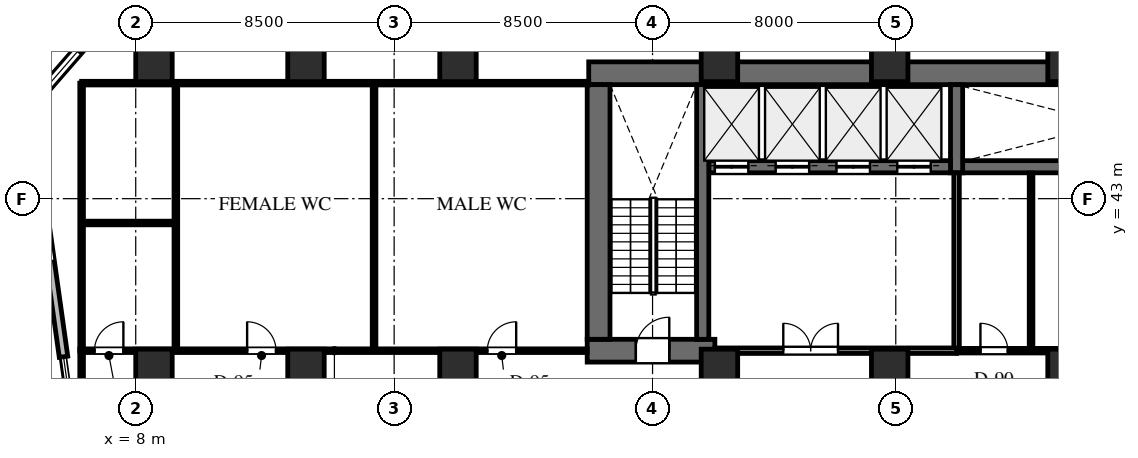
"""IFC4 building model, lengths in metres.
Left out: names, types, materials, properties, quantities, classifications, styles, units other than length and angle.
Written with IfcOpenShell. Run it as: python <this file> out.ifc"""

import sys

from ifc_helpers import new_model, si_unit, direction, frame, frame_2d, origin, origin_2d, place, context, subcontext, project, spatial, rectangle, extrude, element, fill, save


model = new_model("IFC4")
c1 = context("Model", 3, precision=1e-05, world=origin(), true_north=direction((0.0, 1.0)))
c2 = subcontext(c1, "Body", "Model", "MODEL_VIEW")
j1 = project(units=[si_unit("LENGTHUNIT", "METRE"), si_unit("PLANEANGLEUNIT", "RADIAN")], contexts=[c1])
p1 = place(None, origin())
s1 = spatial("IfcSite", under=j1, at=p1, CompositionType="ELEMENT")
p2 = place(p1, origin())
s2 = spatial("IfcBuilding", under=s1, at=p2, CompositionType="ELEMENT")
p3 = place(p2, frame((0.0, 0.0, 77.5)))
s3 = spatial("IfcBuildingStorey", under=s2, at=p3, CompositionType="ELEMENT", Elevation=77.5)
p4 = place(p3, frame((22.9, 47.125, 0.0), z_axis=(0.0, 0.0, 1.0), x_axis=(1.0, 0.0, 0.0)))
e1 = element("IfcWall", 1, at=p4, inside=s3, PredefinedType="SHEAR", context=c2, shape_type="SweptSolid", body=[
    extrude(rectangle(XDim=43.7, YDim=0.75, at=frame_2d((21.85, 0.0))), origin(), (0.0, 0.0, 1.0), 4.0),
])
p5 = place(p3, frame((35.2, 44.05, 0.0), z_axis=(0.0, 0.0, 1.0), x_axis=(1.0, 0.0, 0.0)))
e2 = element("IfcWall", 2, at=p5, inside=s3, PredefinedType="SHEAR", context=c2, shape_type="SweptSolid", body=[
    extrude(rectangle(XDim=9.65, YDim=0.4, at=frame_2d((4.825, 0.0))), origin(), (0.0, 0.0, 1.0), 4.0),
])
p6 = place(p3, frame((35.0, 43.85, 0.0), z_axis=(0.0, 0.0, 1.0), x_axis=(0.0, 1.0, 0.0)))
e3 = element("IfcWall", 3, at=p6, inside=s3, PredefinedType="SHEAR", context=c2, shape_type="SweptSolid", body=[
    extrude(rectangle(XDim=2.9, YDim=0.4, at=frame_2d((1.45, 0.0))), origin(), (0.0, 0.0, 1.0), 4.0),
])
p7 = place(p3, frame((26.85, 44.05, 0.0), z_axis=(0.0, 0.0, 1.0), x_axis=(1.0, 0.0, 0.0)))
e4 = element("IfcWall", 4, at=p7, inside=s3, PredefinedType="SHEAR", context=c2, shape_type="SweptSolid", body=[
    extrude(rectangle(XDim=7.95, YDim=0.4, at=frame_2d((3.975, 0.0))), origin(), (0.0, 0.0, 1.0), 4.0),
])
p8 = place(p7, frame((0.2, 0.0, 0.0)))
e5 = element("IfcOpeningElement", 5, at=p8, cuts=e4, PredefinedType="OPENING", context=c2, shape_type="SweptSolid", body=[
    extrude(rectangle(XDim=1.1, YDim=2.2, at=frame_2d((0.55, 1.1))), frame((0.0, 0.21, 0.0), z_axis=(0.0, -1.0, 0.0), x_axis=(1.0, 0.0, 0.0)), (0.0, 0.0, 1.0), 0.42),
])
p9 = place(p7, frame((2.2, 0.0, 0.0)))
e6 = element("IfcOpeningElement", 6, at=p9, cuts=e4, PredefinedType="OPENING", context=c2, shape_type="SweptSolid", body=[
    extrude(rectangle(XDim=1.1, YDim=2.2, at=frame_2d((0.55, 1.1))), frame((0.0, 0.21, 0.0), z_axis=(0.0, -1.0, 0.0), x_axis=(1.0, 0.0, 0.0)), (0.0, 0.0, 1.0), 0.42),
])
p10 = place(p7, frame((4.2, 0.0, 0.0)))
e7 = element("IfcOpeningElement", 7, at=p10, cuts=e4, PredefinedType="OPENING", context=c2, shape_type="SweptSolid", body=[
    extrude(rectangle(XDim=1.1, YDim=2.2, at=frame_2d((0.55, 1.1))), frame((0.0, 0.21, 0.0), z_axis=(0.0, -1.0, 0.0), x_axis=(1.0, 0.0, 0.0)), (0.0, 0.0, 1.0), 0.42),
])
p11 = place(p7, frame((6.2, 0.0, 0.0)))
e8 = element("IfcOpeningElement", 8, at=p11, cuts=e4, PredefinedType="OPENING", context=c2, shape_type="SweptSolid", body=[
    extrude(rectangle(XDim=1.1, YDim=2.2, at=frame_2d((0.55, 1.1))), frame((0.0, 0.21, 0.0), z_axis=(0.0, -1.0, 0.0), x_axis=(1.0, 0.0, 0.0)), (0.0, 0.0, 1.0), 0.42),
])
p12 = place(p3, frame((22.85, 38.0, 0.0), z_axis=(0.0, 0.0, 1.0), x_axis=(1.0, 0.0, 0.0)))
e9 = element("IfcWall", 9, at=p12, inside=s3, PredefinedType="SHEAR", context=c2, shape_type="SweptSolid", body=[
    extrude(rectangle(XDim=4.2, YDim=0.75, at=frame_2d((2.1, 0.0))), origin(), (0.0, 0.0, 1.0), 4.0),
])
p13 = place(p12, frame((1.6, 0.0, 0.0)))
e10 = element("IfcOpeningElement", 10, at=p13, cuts=e9, PredefinedType="OPENING", context=c2, shape_type="SweptSolid", body=[
    extrude(rectangle(XDim=1.1, YDim=2.2, at=frame_2d((0.55, 1.1))), frame((0.0, 0.385, 0.0), z_axis=(0.0, -1.0, 0.0), x_axis=(1.0, 0.0, 0.0)), (0.0, 0.0, 1.0), 0.77),
])
p14 = place(p3, frame((23.225, 38.375, 0.0), z_axis=(0.0, 0.0, 1.0), x_axis=(0.0, 1.0, 0.0)))
e11 = element("IfcWall", 11, at=p14, inside=s3, PredefinedType="SHEAR", context=c2, shape_type="SweptSolid", body=[
    extrude(rectangle(XDim=8.375, YDim=0.75, at=frame_2d((4.188, 0.0))), origin(), (0.0, 0.0, 1.0), 4.0),
])
p15 = place(p3, frame((26.65, 38.375, 0.0), z_axis=(0.0, 0.0, 1.0), x_axis=(0.0, 1.0, 0.0)))
e12 = element("IfcWall", 12, at=p15, inside=s3, PredefinedType="SHEAR", context=c2, shape_type="SweptSolid", body=[
    extrude(rectangle(XDim=8.375, YDim=0.4, at=frame_2d((4.188, 0.0))), origin(), (0.0, 0.0, 1.0), 4.0),
])
for number, where, z_axis, x_axis in (
    (13, (38.6, 37.35, 0.0), (0.0, 0.0, 1.0), (1.0, 0.0, 0.0)),
    (14, (38.6, 47.55, 0.0), (0.0, 0.0, 1.0), (1.0, 0.0, 0.0)),
    (15, (32.8, 37.35, 0.0), (0.0, 0.0, 1.0), (1.0, 0.0, 0.0)),
    (16, (32.8, 47.55, 0.0), (0.0, 0.0, 1.0), (1.0, 0.0, 0.0)),
    (17, (27.2, 37.35, 0.0), (0.0, 0.0, 1.0), (1.0, 0.0, 0.0)),
    (18, (27.2, 47.55, 0.0), (0.0, 0.0, 1.0), (1.0, 0.0, 0.0)),
    (19, (18.6, 37.35, 0.0), (0.0, 0.0, 1.0), (1.0, 0.0, 0.0)),
    (20, (18.6, 47.55, 0.0), (0.0, 0.0, 1.0), (1.0, 0.0, 0.0)),
    (21, (13.6, 37.35, 0.0), (0.0, 0.0, 1.0), (1.0, 0.0, 0.0)),
    (22, (13.6, 47.55, 0.0), (0.0, 0.0, 1.0), (1.0, 0.0, 0.0)),
    (23, (8.6, 37.35, 0.0), (0.0, 0.0, 1.0), (1.0, 0.0, 0.0)),
    (24, (8.6, 47.55, 0.0), (0.0, 0.0, 1.0), (1.0, 0.0, 0.0)),
):
    element("IfcColumn", number, at=place(p3, frame(where, z_axis=z_axis, x_axis=x_axis)), inside=s3, PredefinedType="COLUMN", context=c2, shape_type="SweptSolid", body=[
        extrude(rectangle(XDim=1.2, YDim=1.4, at=origin_2d()), origin(), (0.0, 0.0, 1.0), 4.0),
    ])
p16 = place(p3, frame((5.625, 37.8, 0.0), z_axis=(0.0, 0.0, 1.0), x_axis=(-0.139180172484, 0.990267074878, 0.0)))
e25 = element("IfcWall", 25, at=p16, inside=s3, PredefinedType="STANDARD", context=c2, shape_type="SweptSolid", body=[
    extrude(rectangle(XDim=8.267, YDim=0.28, at=frame_2d((4.134, 0.0))), origin(), (0.0, 0.0, 1.0), 3.74),
])
p17 = place(p16, frame((3.173, 0.0, 0.65)))
e26 = element("IfcOpeningElement", 26, at=p17, cuts=e25, PredefinedType="OPENING", context=c2, shape_type="SweptSolid", body=[
    extrude(rectangle(XDim=1.8, YDim=2.1, at=frame_2d((0.9, 1.05))), frame((0.0, 0.15, 0.0), z_axis=(0.0, -1.0, 0.0), x_axis=(1.0, 0.0, 0.0)), (0.0, 0.0, 1.0), 0.3),
])
p18 = place(p3, frame((4.474, 45.987, 0.0), z_axis=(0.0, 0.0, 1.0), x_axis=(0.656070053895, 0.754699996278, 0.0)))
e27 = element("IfcWall", 27, at=p18, inside=s3, PredefinedType="STANDARD", context=c2, shape_type="SweptSolid", body=[
    extrude(rectangle(XDim=3.171, YDim=0.28, at=frame_2d((1.585, 0.0))), origin(), (0.0, 0.0, 1.0), 3.74),
])
p19 = place(p18, frame((0.667, 0.0, 0.65)))
e28 = element("IfcOpeningElement", 28, at=p19, cuts=e27, PredefinedType="OPENING", context=c2, shape_type="SweptSolid", body=[
    extrude(rectangle(XDim=1.8, YDim=2.1, at=frame_2d((0.9, 1.05))), frame((0.0, 0.15, 0.0), z_axis=(0.0, -1.0, 0.0), x_axis=(1.0, 0.0, 0.0)), (0.0, 0.0, 1.0), 0.3),
])
p20 = place(p3, frame((35.0, 38.0, 0.0), z_axis=(0.0, 0.0, 1.0), x_axis=(0.0, 1.0, 0.0)))
e29 = element("IfcWall", 29, at=p20, inside=s3, PredefinedType="STANDARD", context=c2, shape_type="SweptSolid", body=[
    extrude(rectangle(XDim=5.85, YDim=0.18, at=frame_2d((2.925, 0.0))), origin(), (0.0, 0.0, 1.0), 3.74),
])
p21 = place(p3, frame((27.05, 38.0, 0.0), z_axis=(0.0, 0.0, 1.0), x_axis=(1.0, 0.0, 0.0)))
e30 = element("IfcWall", 30, at=p21, inside=s3, PredefinedType="STANDARD", context=c2, shape_type="SweptSolid", body=[
    extrude(rectangle(XDim=7.95, YDim=0.18, at=frame_2d((3.975, 0.0))), origin(), (0.0, 0.0, 1.0), 2.813),
])
p22 = place(p21, frame((2.25, 0.0, 0.0)))
e31 = element("IfcOpeningElement", 31, at=p22, cuts=e30, PredefinedType="OPENING", context=c2, shape_type="SweptSolid", body=[
    extrude(rectangle(XDim=1.8, YDim=2.2, at=frame_2d((0.9, 1.1))), frame((0.0, 0.1, 0.0), z_axis=(0.0, -1.0, 0.0), x_axis=(1.0, 0.0, 0.0)), (0.0, 0.0, 1.0), 0.2),
])
p23 = place(p3, frame((35.0, 38.0, 0.0), z_axis=(0.0, 0.0, 1.0), x_axis=(1.0, 0.0, 0.0)))
e32 = element("IfcWall", 32, at=p23, inside=s3, PredefinedType="PARTITIONING", context=c2, shape_type="SweptSolid", body=[
    extrude(rectangle(XDim=10.05, YDim=0.15, at=frame_2d((5.025, 0.0))), origin(), (0.0, 0.0, 1.0), 2.813),
])
p24 = place(p23, frame((0.785, 0.0, 0.0)))
e33 = element("IfcOpeningElement", 33, at=p24, cuts=e32, PredefinedType="OPENING", context=c2, shape_type="SweptSolid", body=[
    extrude(rectangle(XDim=0.9, YDim=2.1, at=frame_2d((0.45, 1.05))), frame((0.0, 0.085, 0.0), z_axis=(0.0, -1.0, 0.0), x_axis=(1.0, 0.0, 0.0)), (0.0, 0.0, 1.0), 0.17),
])
p25 = place(p23, frame((5.3, 0.0, 0.0)))
e34 = element("IfcOpeningElement", 34, at=p25, cuts=e32, PredefinedType="OPENING", context=c2, shape_type="SweptSolid", body=[
    extrude(rectangle(XDim=0.9, YDim=2.1, at=frame_2d((0.45, 1.05))), frame((0.0, 0.085, 0.0), z_axis=(0.0, -1.0, 0.0), x_axis=(1.0, 0.0, 0.0)), (0.0, 0.0, 1.0), 0.17),
])
p26 = place(p23, frame((7.2, 0.0, 0.0)))
e35 = element("IfcOpeningElement", 35, at=p26, cuts=e32, PredefinedType="OPENING", context=c2, shape_type="SweptSolid", body=[
    extrude(rectangle(XDim=0.9, YDim=2.1, at=frame_2d((0.45, 1.05))), frame((0.0, 0.085, 0.0), z_axis=(0.0, -1.0, 0.0), x_axis=(1.0, 0.0, 0.0)), (0.0, 0.0, 1.0), 0.17),
])
p27 = place(p3, frame((37.45, 38.068, 0.0), z_axis=(0.0, 0.0, 1.0), x_axis=(0.0, 1.0, 0.0)))
e36 = element("IfcWall", 36, at=p27, inside=s3, PredefinedType="PARTITIONING", context=c2, shape_type="SweptSolid", body=[
    extrude(rectangle(XDim=5.774, YDim=0.12, at=frame_2d((2.887, 0.0))), origin(), (0.0, 0.0, 1.0), 3.74),
])
p28 = place(p3, frame((6.22, 38.0, 0.0), z_axis=(0.0, 0.0, 1.0), x_axis=(1.0, 0.0, 0.0)))
e37 = element("IfcWall", 37, at=p28, inside=s3, PredefinedType="PARTITIONING", context=c2, shape_type="SweptSolid", body=[
    extrude(rectangle(XDim=16.63, YDim=0.12, at=frame_2d((8.315, 0.0))), origin(), (0.0, 0.0, 1.0), 2.813),
])
p29 = place(p28, frame((0.424, 0.0, 0.0)))
e38 = element("IfcOpeningElement", 38, at=p29, cuts=e37, PredefinedType="OPENING", context=c2, shape_type="SweptSolid", body=[
    extrude(rectangle(XDim=0.95, YDim=2.15, at=frame_2d((0.475, 1.075))), frame((0.0, 0.07, 0.0), z_axis=(0.0, -1.0, 0.0), x_axis=(1.0, 0.0, 0.0)), (0.0, 0.0, 1.0), 0.14),
])
p30 = place(p28, frame((5.444, 0.0, 0.0)))
e39 = element("IfcOpeningElement", 39, at=p30, cuts=e37, PredefinedType="OPENING", context=c2, shape_type="SweptSolid", body=[
    extrude(rectangle(XDim=0.95, YDim=2.15, at=frame_2d((0.475, 1.075))), frame((0.0, 0.07, 0.0), z_axis=(0.0, -1.0, 0.0), x_axis=(1.0, 0.0, 0.0)), (0.0, 0.0, 1.0), 0.14),
])
p31 = place(p28, frame((13.344, 0.0, 0.0)))
e40 = element("IfcOpeningElement", 40, at=p31, cuts=e37, PredefinedType="OPENING", context=c2, shape_type="SweptSolid", body=[
    extrude(rectangle(XDim=0.95, YDim=2.15, at=frame_2d((0.475, 1.075))), frame((0.0, 0.07, 0.0), z_axis=(0.0, -1.0, 0.0), x_axis=(1.0, 0.0, 0.0)), (0.0, 0.0, 1.0), 0.14),
])
p32 = place(p3, frame((6.22, 38.0, 0.0), z_axis=(0.0, 0.0, 1.0), x_axis=(0.0, 1.0, 0.0)))
e41 = element("IfcWall", 41, at=p32, inside=s3, PredefinedType="PARTITIONING", context=c2, shape_type="SweptSolid", body=[
    extrude(rectangle(XDim=8.8, YDim=0.12, at=frame_2d((4.4, 0.0))), origin(), (0.0, 0.0, 1.0), 3.74),
])
p33 = place(p3, frame((6.22, 46.8, 0.0), z_axis=(0.0, 0.0, 1.0), x_axis=(1.0, 0.0, 0.0)))
e42 = element("IfcWall", 42, at=p33, inside=s3, PredefinedType="PARTITIONING", context=c2, shape_type="SweptSolid", body=[
    extrude(rectangle(XDim=16.68, YDim=0.12, at=frame_2d((8.34, 0.0))), origin(), (0.0, 0.0, 1.0), 2.813),
])
for number, where, z_axis, x_axis in (
    (43, (9.32, 38.068, 0.0), (0.0, 0.0, 1.0), (0.0, 1.0, 0.0)),
    (44, (15.84, 38.068, 0.0), (0.0, 0.0, 1.0), (0.0, 1.0, 0.0)),
):
    element("IfcWall", number, at=place(p3, frame(where, z_axis=z_axis, x_axis=x_axis)), inside=s3, PredefinedType="PARTITIONING", context=c2, shape_type="SweptSolid", body=[
        extrude(rectangle(XDim=8.664, YDim=0.12, at=frame_2d((4.332, 0.0))), origin(), (0.0, 0.0, 1.0), 3.74),
    ])
p34 = place(p3, frame((6.288, 42.2, 0.0), z_axis=(0.0, 0.0, 1.0), x_axis=(1.0, 0.0, 0.0)))
e45 = element("IfcWall", 45, at=p34, inside=s3, PredefinedType="PARTITIONING", context=c2, shape_type="SweptSolid", body=[
    extrude(rectangle(XDim=2.964, YDim=0.12, at=frame_2d((1.482, 0.0))), origin(), (0.0, 0.0, 1.0), 2.813),
])
p35 = place(p3, frame((6.22, 34.4, 0.0), z_axis=(0.0, 0.0, 1.0), x_axis=(0.0, 1.0, 0.0)))
e46 = element("IfcWall", 46, at=p35, inside=s3, PredefinedType="PARTITIONING", context=c2, shape_type="SweptSolid", body=[
    extrude(rectangle(XDim=3.65, YDim=0.12, at=frame_2d((1.825, 0.0))), origin(), (0.0, 0.0, 1.0), 3.74),
])
p36 = place(p19, origin())
e47 = element("IfcWindow", 47, at=p36, inside=s3, PartitioningType="SINGLE_PANEL", PredefinedType="WINDOW", context=c2, shape_type="SweptSolid", body=[
    extrude(rectangle(XDim=1.8, YDim=2.1, at=frame_2d((0.9, 1.05))), frame((0.0, 0.03, 0.0), z_axis=(0.0, -1.0, 0.0), x_axis=(1.0, 0.0, 0.0)), (0.0, 0.0, 1.0), 0.06),
])
fill(e28, e47)
p37 = place(p13, origin())
e48 = element("IfcDoor", 48, at=p37, inside=s3, OperationType="SINGLE_SWING_RIGHT", PredefinedType="DOOR", context=c2, shape_type="SweptSolid", body=[
    extrude(rectangle(XDim=1.1, YDim=2.2, at=frame_2d((0.55, 1.1))), frame((0.0, 0.025, 0.0), z_axis=(0.0, -1.0, 0.0), x_axis=(1.0, 0.0, 0.0)), (0.0, 0.0, 1.0), 0.05),
])
fill(e10, e48)
p38 = place(p8, origin())
e49 = element("IfcDoor", 49, at=p38, inside=s3, OperationType="DOUBLE_DOOR_SLIDING", PredefinedType="DOOR", context=c2, shape_type="SweptSolid", body=[
    extrude(rectangle(XDim=1.1, YDim=2.2, at=frame_2d((0.55, 1.1))), frame((0.0, 0.025, 0.0), z_axis=(0.0, -1.0, 0.0), x_axis=(1.0, 0.0, 0.0)), (0.0, 0.0, 1.0), 0.05),
])
fill(e5, e49)
p39 = place(p9, origin())
e50 = element("IfcDoor", 50, at=p39, inside=s3, OperationType="DOUBLE_DOOR_SLIDING", PredefinedType="DOOR", context=c2, shape_type="SweptSolid", body=[
    extrude(rectangle(XDim=1.1, YDim=2.2, at=frame_2d((0.55, 1.1))), frame((0.0, 0.025, 0.0), z_axis=(0.0, -1.0, 0.0), x_axis=(1.0, 0.0, 0.0)), (0.0, 0.0, 1.0), 0.05),
])
fill(e6, e50)
p40 = place(p10, origin())
e51 = element("IfcDoor", 51, at=p40, inside=s3, OperationType="DOUBLE_DOOR_SLIDING", PredefinedType="DOOR", context=c2, shape_type="SweptSolid", body=[
    extrude(rectangle(XDim=1.1, YDim=2.2, at=frame_2d((0.55, 1.1))), frame((0.0, 0.025, 0.0), z_axis=(0.0, -1.0, 0.0), x_axis=(1.0, 0.0, 0.0)), (0.0, 0.0, 1.0), 0.05),
])
fill(e7, e51)
p41 = place(p11, origin())
e52 = element("IfcDoor", 52, at=p41, inside=s3, OperationType="DOUBLE_DOOR_SLIDING", PredefinedType="DOOR", context=c2, shape_type="SweptSolid", body=[
    extrude(rectangle(XDim=1.1, YDim=2.2, at=frame_2d((0.55, 1.1))), frame((0.0, 0.025, 0.0), z_axis=(0.0, -1.0, 0.0), x_axis=(1.0, 0.0, 0.0)), (0.0, 0.0, 1.0), 0.05),
])
fill(e8, e52)
p42 = place(p22, origin())
e53 = element("IfcDoor", 53, at=p42, inside=s3, OperationType="DOUBLE_DOOR_SINGLE_SWING", PredefinedType="DOOR", context=c2, shape_type="SweptSolid", body=[
    extrude(rectangle(XDim=1.8, YDim=2.2, at=frame_2d((0.9, 1.1))), frame((0.0, 0.025, 0.0), z_axis=(0.0, -1.0, 0.0), x_axis=(1.0, 0.0, 0.0)), (0.0, 0.0, 1.0), 0.05),
])
fill(e31, e53)
p43 = place(p24, origin())
e54 = element("IfcDoor", 54, at=p43, inside=s3, OperationType="SINGLE_SWING_LEFT", PredefinedType="DOOR", context=c2, shape_type="SweptSolid", body=[
    extrude(rectangle(XDim=0.9, YDim=2.1, at=frame_2d((0.45, 1.05))), frame((0.0, 0.025, 0.0), z_axis=(0.0, -1.0, 0.0), x_axis=(1.0, 0.0, 0.0)), (0.0, 0.0, 1.0), 0.05),
])
fill(e33, e54)
p44 = place(p29, origin())
e55 = element("IfcDoor", 55, at=p44, inside=s3, OperationType="SINGLE_SWING_RIGHT", PredefinedType="DOOR", context=c2, shape_type="SweptSolid", body=[
    extrude(rectangle(XDim=0.95, YDim=2.15, at=frame_2d((0.475, 1.075))), frame((0.0, 0.025, 0.0), z_axis=(0.0, -1.0, 0.0), x_axis=(1.0, 0.0, 0.0)), (0.0, 0.0, 1.0), 0.05),
])
fill(e38, e55)
p45 = place(p30, origin())
e56 = element("IfcDoor", 56, at=p45, inside=s3, OperationType="SINGLE_SWING_LEFT", PredefinedType="DOOR", context=c2, shape_type="SweptSolid", body=[
    extrude(rectangle(XDim=0.95, YDim=2.15, at=frame_2d((0.475, 1.075))), frame((0.0, 0.025, 0.0), z_axis=(0.0, -1.0, 0.0), x_axis=(1.0, 0.0, 0.0)), (0.0, 0.0, 1.0), 0.05),
])
fill(e39, e56)
p46 = place(p31, origin())
e57 = element("IfcDoor", 57, at=p46, inside=s3, OperationType="SINGLE_SWING_RIGHT", PredefinedType="DOOR", context=c2, shape_type="SweptSolid", body=[
    extrude(rectangle(XDim=0.95, YDim=2.15, at=frame_2d((0.475, 1.075))), frame((0.0, 0.025, 0.0), z_axis=(0.0, -1.0, 0.0), x_axis=(1.0, 0.0, 0.0)), (0.0, 0.0, 1.0), 0.05),
])
fill(e40, e57)
save(model, sys.argv[1])
